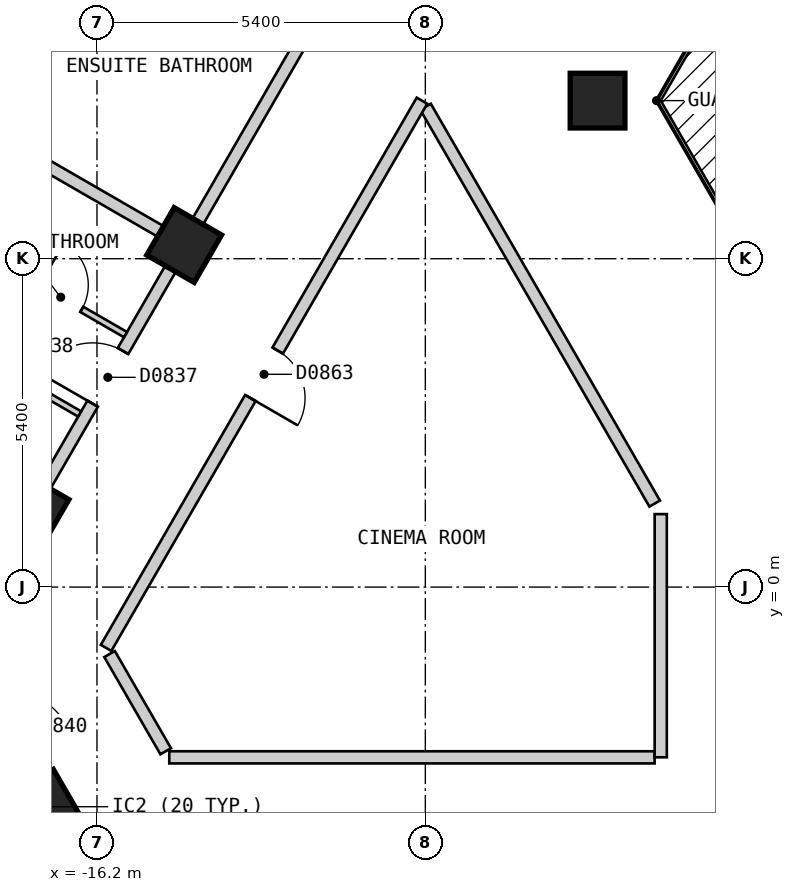
"""IFC4 building model, lengths in metres.
Left out: names, types, materials, properties, quantities, classifications, styles, units other than length and angle.
Written with IfcOpenShell. Run it as: python <this file> out.ifc"""

import sys

from ifc_helpers import new_model, si_unit, direction, frame, frame_2d, origin, origin_2d, place, context, subcontext, project, spatial, polyline, rectangle, outline, extrude, element, fill, save


model = new_model("IFC4")
c1 = context("Model", 3, precision=1e-05, world=origin(), true_north=direction((0.0, 1.0)))
c2 = subcontext(c1, "Body", "Model", "MODEL_VIEW")
j1 = project(units=[si_unit("LENGTHUNIT", "METRE"), si_unit("PLANEANGLEUNIT", "RADIAN")], contexts=[c1])
p1 = place(None, origin())
s1 = spatial("IfcSite", under=j1, at=p1, CompositionType="ELEMENT")
p2 = place(p1, origin())
s2 = spatial("IfcBuilding", under=s1, at=p2, CompositionType="ELEMENT")
p3 = place(p2, frame((0.0, 0.0, 84.0)))
s3 = spatial("IfcBuildingStorey", under=s2, at=p3, CompositionType="ELEMENT", Elevation=84.0)
for number, where, z_axis, x_axis in (
    (1, (-17.083, -3.612, 0.0), (0.0, 0.0, 1.0), (0.5, -0.866, 0.0)),
    (2, (-7.967, 8.0, 0.0), (0.0, 0.0, 1.0), (1.0, 0.0, 0.0)),
    (3, (-14.766, 5.625, 0.0), (0.0, 0.0, 1.0), (-0.5, -0.866, 0.0)),
    (4, (-17.277, 1.275, 0.0), (0.0, 0.0, 1.0), (-0.5, -0.866, 0.0)),
):
    element("IfcColumn", number, at=place(p3, frame(where, z_axis=z_axis, x_axis=x_axis)), inside=s3, PredefinedType="COLUMN", context=c2, shape_type="SweptSolid", body=[
        extrude(rectangle(XDim=0.9, YDim=0.9, at=origin_2d()), origin(), (0.0, 0.0, 1.0), 3.0),
    ])
p4 = place(p3, frame((-15.747, 24.425, 0.0), z_axis=(0.0, 0.0, 1.0), x_axis=(-0.500027479704, -0.866009537788, 0.0)))
e5 = element("IfcWall", 5, at=p4, inside=s3, PredefinedType="SOLIDWALL", context=c2, shape_type="SweptSolid", body=[
    extrude(outline(polyline([(0.0, -0.15), (26.559, -0.15), (26.478, 0.15), (0.08, 0.15), (0.0, -0.15)])), origin(), (0.0, 0.0, 1.0), 2.7),
])
p5 = place(p4, frame((2.483, 0.0, 0.15)))
e6 = element("IfcOpeningElement", 6, at=p5, cuts=e5, PredefinedType="OPENING", context=c2, shape_type="SweptSolid", body=[
    extrude(rectangle(XDim=1.5, YDim=2.1, at=frame_2d((0.75, 1.05))), frame((0.0, 0.16, 0.0), z_axis=(0.0, -1.0, 0.0), x_axis=(1.0, 0.0, 0.0)), (0.0, 0.0, 1.0), 0.32),
])
p6 = place(p4, frame((7.506, 0.0, 0.15)))
e7 = element("IfcOpeningElement", 7, at=p6, cuts=e5, PredefinedType="OPENING", context=c2, shape_type="SweptSolid", body=[
    extrude(rectangle(XDim=1.5, YDim=2.1, at=frame_2d((0.75, 1.05))), frame((0.0, 0.16, 0.0), z_axis=(0.0, -1.0, 0.0), x_axis=(1.0, 0.0, 0.0)), (0.0, 0.0, 1.0), 0.32),
])
p7 = place(p4, frame((12.529, 0.0, 0.15)))
e8 = element("IfcOpeningElement", 8, at=p7, cuts=e5, PredefinedType="OPENING", context=c2, shape_type="SweptSolid", body=[
    extrude(rectangle(XDim=1.5, YDim=2.1, at=frame_2d((0.75, 1.05))), frame((0.0, 0.16, 0.0), z_axis=(0.0, -1.0, 0.0), x_axis=(1.0, 0.0, 0.0)), (0.0, 0.0, 1.0), 0.32),
])
p8 = place(p4, frame((17.552, 0.0, 0.15)))
e9 = element("IfcOpeningElement", 9, at=p8, cuts=e5, PredefinedType="OPENING", context=c2, shape_type="SweptSolid", body=[
    extrude(rectangle(XDim=1.5, YDim=2.1, at=frame_2d((0.75, 1.05))), frame((0.0, 0.16, 0.0), z_axis=(0.0, -1.0, 0.0), x_axis=(1.0, 0.0, 0.0)), (0.0, 0.0, 1.0), 0.32),
])
p9 = place(p4, frame((22.575, 0.0, 0.15)))
e10 = element("IfcOpeningElement", 10, at=p9, cuts=e5, PredefinedType="OPENING", context=c2, shape_type="SweptSolid", body=[
    extrude(rectangle(XDim=1.5, YDim=2.1, at=frame_2d((0.75, 1.05))), frame((0.0, 0.16, 0.0), z_axis=(0.0, -1.0, 0.0), x_axis=(1.0, 0.0, 0.0)), (0.0, 0.0, 1.0), 0.32),
])
p10 = place(p3, frame((-10.796, 7.899, 0.0), z_axis=(0.0, 0.0, 1.0), x_axis=(0.500010383074, -0.866019409031, 0.0)))
e11 = element("IfcWall", 11, at=p10, inside=s3, PredefinedType="PARTITIONING", context=c2, shape_type="SweptSolid", body=[
    extrude(rectangle(XDim=7.535, YDim=0.2, at=frame_2d((3.768, 0.0))), origin(), (0.0, 0.0, 1.0), 2.7),
])
p11 = place(p3, frame((-15.993, -1.101, 0.0), z_axis=(0.0, 0.0, 1.0), x_axis=(0.499894174133, -0.866086493757, 0.0)))
e12 = element("IfcWall", 12, at=p11, inside=s3, PredefinedType="PARTITIONING", context=c2, shape_type="SweptSolid", body=[
    extrude(rectangle(XDim=1.846, YDim=0.2, at=frame_2d((0.923, 0.0))), origin(), (0.0, 0.0, 1.0), 2.7),
])
p12 = place(p3, frame((-18.533, -1.101, 0.0), z_axis=(0.0, 0.0, 1.0), x_axis=(0.500022085096, -0.866012652573, 0.0)))
e13 = element("IfcWall", 13, at=p12, inside=s3, PredefinedType="PARTITIONING", context=c2, shape_type="SweptSolid", body=[
    extrude(rectangle(XDim=6.066, YDim=0.2, at=frame_2d((3.033, 0.0))), origin(), (0.0, 0.0, 1.0), 2.7),
])
p13 = place(p12, frame((0.892, 0.0, 0.0)))
e14 = element("IfcOpeningElement", 14, at=p13, cuts=e13, PredefinedType="OPENING", context=c2, shape_type="SweptSolid", body=[
    extrude(rectangle(XDim=1.0, YDim=2.1, at=frame_2d((0.5, 1.05))), frame((0.0, 0.11, 0.0), z_axis=(0.0, -1.0, 0.0), x_axis=(1.0, 0.0, 0.0)), (0.0, 0.0, 1.0), 0.22),
])
p14 = place(p3, frame((-15.011, -2.8, 0.0), z_axis=(0.0, 0.0, 1.0), x_axis=(1.0, 0.0, 0.0)))
e15 = element("IfcWall", 15, at=p14, inside=s3, PredefinedType="PARTITIONING", context=c2, shape_type="SweptSolid", body=[
    extrude(rectangle(XDim=7.982, YDim=0.2, at=frame_2d((3.991, 0.0))), origin(), (0.0, 0.0, 1.0), 2.7),
])
p15 = place(p3, frame((-16.05, -1.0, 0.0), z_axis=(0.0, 0.0, 1.0), x_axis=(0.499962449088, 0.866047082728, 0.0)))
e16 = element("IfcWall", 16, at=p15, inside=s3, PredefinedType="PARTITIONING", context=c2, shape_type="SweptSolid", body=[
    extrude(rectangle(XDim=10.391, YDim=0.2, at=frame_2d((5.195, 0.0))), origin(), (0.0, 0.0, 1.0), 2.7),
])
p16 = place(p15, frame((4.745, 0.0, 0.0)))
e17 = element("IfcOpeningElement", 17, at=p16, cuts=e16, PredefinedType="OPENING", context=c2, shape_type="SweptSolid", body=[
    extrude(rectangle(XDim=0.9, YDim=2.1, at=frame_2d((0.45, 1.05))), frame((0.0, 0.11, 0.0), z_axis=(0.0, -1.0, 0.0), x_axis=(1.0, 0.0, 0.0)), (0.0, 0.0, 1.0), 0.22),
])
p17 = place(p3, frame((-18.562, -0.951, 0.0), z_axis=(0.0, 0.0, 1.0), x_axis=(0.499992962407, 0.866029466902, 0.0)))
e18 = element("IfcWall", 18, at=p17, inside=s3, PredefinedType="PARTITIONING", context=c2, shape_type="SweptSolid", body=[
    extrude(rectangle(XDim=20.208, YDim=0.2, at=frame_2d((10.104, 0.0))), origin(), (0.0, 0.0, 1.0), 2.7),
])
p18 = place(p17, frame((14.627, 0.0, 0.0)))
e19 = element("IfcOpeningElement", 19, at=p18, cuts=e18, PredefinedType="OPENING", context=c2, shape_type="SweptSolid", body=[
    extrude(rectangle(XDim=1.0, YDim=2.1, at=frame_2d((0.5, 1.05))), frame((0.0, 0.11, 0.0), z_axis=(0.0, -1.0, 0.0), x_axis=(1.0, 0.0, 0.0)), (0.0, 0.0, 1.0), 0.22),
])
p19 = place(p17, frame((4.581, 0.0, 0.0)))
e20 = element("IfcOpeningElement", 20, at=p19, cuts=e18, PredefinedType="OPENING", context=c2, shape_type="SweptSolid", body=[
    extrude(rectangle(XDim=1.0, YDim=2.1, at=frame_2d((0.5, 1.05))), frame((0.0, 0.11, 0.0), z_axis=(0.0, -1.0, 0.0), x_axis=(1.0, 0.0, 0.0)), (0.0, 0.0, 1.0), 0.22),
])
p20 = place(p3, frame((-6.928, -2.799, 0.0), z_axis=(0.0, 0.0, 1.0), x_axis=(0.0, 1.0, 0.0)))
e21 = element("IfcWall", 21, at=p20, inside=s3, PredefinedType="PARTITIONING", context=c2, shape_type="SweptSolid", body=[
    extrude(rectangle(XDim=3.999, YDim=0.2, at=frame_2d((2.0, 0.0))), origin(), (0.0, 0.0, 1.0), 2.7),
])
p21 = place(p3, frame((-17.905, 5.407, 0.0), z_axis=(0.0, 0.0, 1.0), x_axis=(0.866080321209, -0.499904868165, 0.0)))
e22 = element("IfcWall", 22, at=p21, inside=s3, PredefinedType="PARTITIONING", context=c2, shape_type="SweptSolid", body=[
    extrude(rectangle(XDim=2.51, YDim=0.1, at=frame_2d((1.255, 0.0))), origin(), (0.0, 0.0, 1.0), 2.7),
])
p22 = place(p21, frame((0.88, 0.0, 0.0)))
e23 = element("IfcOpeningElement", 23, at=p22, cuts=e22, PredefinedType="OPENING", context=c2, shape_type="SweptSolid", body=[
    extrude(rectangle(XDim=0.8, YDim=2.1, at=frame_2d((0.4, 1.05))), frame((0.0, 0.06, 0.0), z_axis=(0.0, -1.0, 0.0), x_axis=(1.0, 0.0, 0.0)), (0.0, 0.0, 1.0), 0.12),
])
p23 = place(p3, frame((-18.658, 4.102, 0.0), z_axis=(0.0, 0.0, 1.0), x_axis=(0.865916579361, -0.500188442078, 0.0)))
e24 = element("IfcWall", 24, at=p23, inside=s3, PredefinedType="PARTITIONING", context=c2, shape_type="SweptSolid", body=[
    extrude(rectangle(XDim=2.509, YDim=0.1, at=frame_2d((1.255, 0.0))), origin(), (0.0, 0.0, 1.0), 2.7),
])
p24 = place(p23, frame((0.829, 0.0, 0.0)))
e25 = element("IfcOpeningElement", 25, at=p24, cuts=e24, PredefinedType="OPENING", context=c2, shape_type="SweptSolid", body=[
    extrude(rectangle(XDim=0.9, YDim=2.1, at=frame_2d((0.45, 1.05))), frame((0.0, 0.06, 0.0), z_axis=(0.0, -1.0, 0.0), x_axis=(1.0, 0.0, 0.0)), (0.0, 0.0, 1.0), 0.12),
])
p25 = place(p3, frame((-17.834, 7.512, 0.0), z_axis=(0.0, 0.0, 1.0), x_axis=(0.500093956194, 0.865971151354, 0.0)))
e26 = element("IfcWall", 26, at=p25, inside=s3, PredefinedType="PARTITIONING", context=c2, shape_type="SweptSolid", body=[
    extrude(rectangle(XDim=4.873, YDim=0.1, at=frame_2d((2.437, 0.0))), origin(), (0.0, 0.0, 1.0), 2.7),
])
p26 = place(p25, frame((2.012, 0.0, 0.0)))
e27 = element("IfcOpeningElement", 27, at=p26, cuts=e26, PredefinedType="OPENING", context=c2, shape_type="SweptSolid", body=[
    extrude(rectangle(XDim=0.8, YDim=2.1, at=frame_2d((0.4, 1.05))), frame((0.0, 0.06, 0.0), z_axis=(0.0, -1.0, 0.0), x_axis=(1.0, 0.0, 0.0)), (0.0, 0.0, 1.0), 0.12),
])
p27 = place(p3, frame((-23.513, 10.675, 0.0), z_axis=(0.0, 0.0, 1.0), x_axis=(0.866041268327, -0.499972520799, 0.0)))
e28 = element("IfcWall", 28, at=p27, inside=s3, PredefinedType="PARTITIONING", context=c2, shape_type="SweptSolid", body=[
    extrude(rectangle(XDim=10.0, YDim=0.2, at=frame_2d((5.0, 0.0))), origin(), (0.0, 0.0, 1.0), 2.7),
])
p28 = place(p19, origin())
e29 = element("IfcDoor", 29, at=p28, inside=s3, OperationType="SINGLE_SWING_LEFT", PredefinedType="DOOR", context=c2, shape_type="SweptSolid", body=[
    extrude(rectangle(XDim=1.0, YDim=2.1, at=frame_2d((0.5, 1.05))), frame((0.0, 0.025, 0.0), z_axis=(0.0, -1.0, 0.0), x_axis=(1.0, 0.0, 0.0)), (0.0, 0.0, 1.0), 0.05),
])
fill(e20, e29)
p29 = place(p22, origin())
e30 = element("IfcDoor", 30, at=p29, inside=s3, OperationType="SINGLE_SWING_LEFT", PredefinedType="DOOR", context=c2, shape_type="SweptSolid", body=[
    extrude(rectangle(XDim=0.8, YDim=2.1, at=frame_2d((0.4, 1.05))), frame((0.0, 0.025, 0.0), z_axis=(0.0, -1.0, 0.0), x_axis=(1.0, 0.0, 0.0)), (0.0, 0.0, 1.0), 0.05),
])
fill(e23, e30)
p30 = place(p16, origin())
e31 = element("IfcDoor", 31, at=p30, inside=s3, OperationType="SINGLE_SWING_LEFT", PredefinedType="DOOR", context=c2, shape_type="SweptSolid", body=[
    extrude(rectangle(XDim=0.9, YDim=2.1, at=frame_2d((0.45, 1.05))), frame((0.0, 0.025, 0.0), z_axis=(0.0, -1.0, 0.0), x_axis=(1.0, 0.0, 0.0)), (0.0, 0.0, 1.0), 0.05),
])
fill(e17, e31)
save(model, sys.argv[1])
